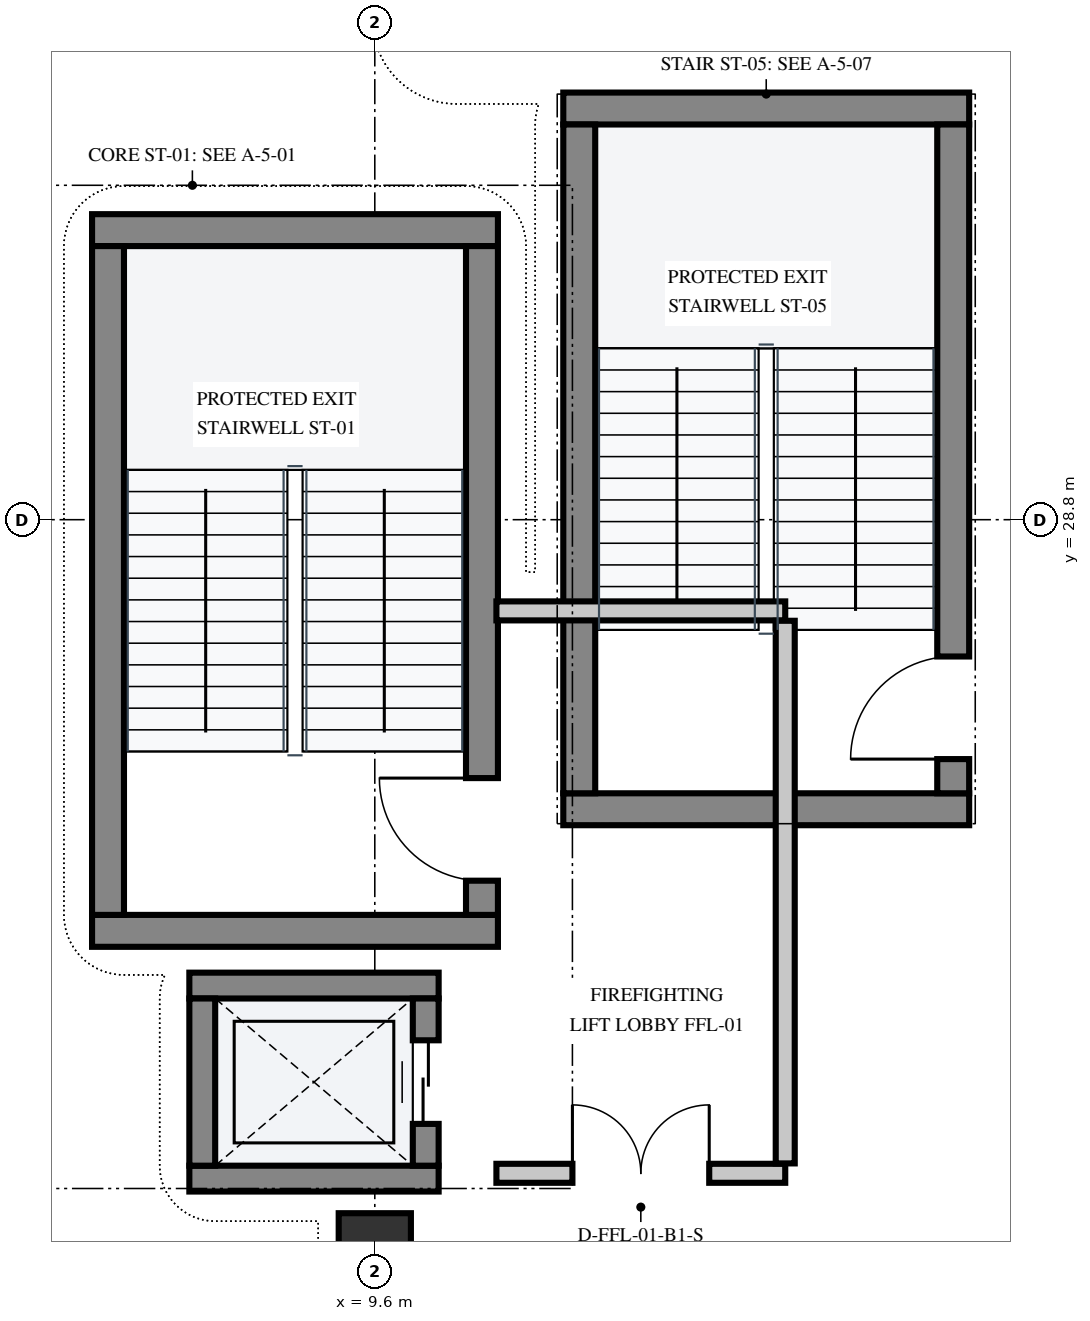
"""IFC4 building model, lengths in metres.
Left out: names, types, materials, properties, quantities, classifications, styles, units other than length and angle.
Written with IfcOpenShell. Run it as: python <this file> out.ifc"""

import sys

from ifc_helpers import new_model, si_unit, direction, frame, frame_2d, origin, origin_2d, place, context, subcontext, project, spatial, rectangle, extrude, element, fill, save


model = new_model("IFC4")
c1 = context("Model", 3, precision=1e-05, world=origin(), true_north=direction((0.0, 1.0)))
c2 = subcontext(c1, "Body", "Model", "MODEL_VIEW")
j1 = project(units=[si_unit("LENGTHUNIT", "METRE"), si_unit("PLANEANGLEUNIT", "RADIAN")], contexts=[c1])
p1 = place(None, origin())
s1 = spatial("IfcSite", under=j1, at=p1, CompositionType="ELEMENT")
p2 = place(p1, origin())
s2 = spatial("IfcBuilding", under=s1, at=p2, CompositionType="ELEMENT")
p3 = place(p2, frame((0.0, 0.0, -4.8)))
s3 = spatial("IfcBuildingStorey", under=s2, at=p3, CompositionType="ELEMENT", Elevation=-4.8)
p4 = place(p3, frame((9.6, 19.2, 0.0), z_axis=(0.0, 0.0, 1.0), x_axis=(1.0, 0.0, 0.0)))
e1 = element("IfcColumn", 1, at=p4, inside=s3, PredefinedType="COLUMN", context=c2, shape_type="SweptSolid", body=[
    extrude(rectangle(XDim=0.95, YDim=0.95, at=origin_2d()), origin(), (0.0, 0.0, 1.0), 4.8),
])
for number, where, z_axis, x_axis in (
    (2, (5.88, 23.39, 0.0), (0.0, 0.0, 1.0), (1.0, 0.0, 0.0)),
    (3, (5.88, 32.61, 0.0), (0.0, 0.0, 1.0), (1.0, 0.0, 0.0)),
):
    element("IfcWall", number, at=place(p3, frame(where, z_axis=z_axis, x_axis=x_axis)), inside=s3, PredefinedType="SHEAR", context=c2, shape_type="SweptSolid", body=[
        extrude(rectangle(XDim=5.34, YDim=0.42, at=frame_2d((2.67, 0.0))), origin(), (0.0, 0.0, 1.0), 4.5),
    ])
p5 = place(p3, frame((11.01, 23.6, 0.0), z_axis=(0.0, 0.0, 1.0), x_axis=(0.0, 1.0, 0.0)))
e4 = element("IfcWall", 4, at=p5, inside=s3, PredefinedType="SHEAR", context=c2, shape_type="SweptSolid", body=[
    extrude(rectangle(XDim=8.8, YDim=0.42, at=frame_2d((4.4, 0.0))), origin(), (0.0, 0.0, 1.0), 4.5),
])
p6 = place(p5, frame((0.45, 0.0, 0.0)))
e5 = element("IfcOpeningElement", 5, at=p6, cuts=e4, PredefinedType="OPENING", context=c2, shape_type="SweptSolid", body=[
    extrude(rectangle(XDim=1.35, YDim=2.2, at=frame_2d((0.675, 1.1))), frame((0.0, 0.222, 0.0), z_axis=(0.0, -1.0, 0.0), x_axis=(1.0, 0.0, 0.0)), (0.0, 0.0, 1.0), 0.444),
])
p7 = place(p3, frame((6.09, 23.6, 0.0), z_axis=(0.0, 0.0, 1.0), x_axis=(0.0, 1.0, 0.0)))
e6 = element("IfcWall", 6, at=p7, inside=s3, PredefinedType="SHEAR", context=c2, shape_type="SweptSolid", body=[
    extrude(rectangle(XDim=8.8, YDim=0.42, at=frame_2d((4.4, 0.0))), origin(), (0.0, 0.0, 1.0), 4.5),
])
for number, where, z_axis, x_axis in (
    (7, (12.08, 24.99, 0.0), (0.0, 0.0, 1.0), (1.0, 0.0, 0.0)),
    (8, (12.08, 34.21, 0.0), (0.0, 0.0, 1.0), (1.0, 0.0, 0.0)),
):
    element("IfcWall", number, at=place(p3, frame(where, z_axis=z_axis, x_axis=x_axis)), inside=s3, PredefinedType="SHEAR", context=c2, shape_type="SweptSolid", body=[
        extrude(rectangle(XDim=5.34, YDim=0.42, at=frame_2d((2.67, 0.0))), origin(), (0.0, 0.0, 1.0), 4.5),
    ])
p8 = place(p3, frame((17.21, 25.2, 0.0), z_axis=(0.0, 0.0, 1.0), x_axis=(0.0, 1.0, 0.0)))
e9 = element("IfcWall", 9, at=p8, inside=s3, PredefinedType="SHEAR", context=c2, shape_type="SweptSolid", body=[
    extrude(rectangle(XDim=8.8, YDim=0.42, at=frame_2d((4.4, 0.0))), origin(), (0.0, 0.0, 1.0), 4.5),
])
p9 = place(p8, frame((0.45, 0.0, 0.0)))
e10 = element("IfcOpeningElement", 10, at=p9, cuts=e9, PredefinedType="OPENING", context=c2, shape_type="SweptSolid", body=[
    extrude(rectangle(XDim=1.35, YDim=2.2, at=frame_2d((0.675, 1.1))), frame((0.0, 0.222, 0.0), z_axis=(0.0, -1.0, 0.0), x_axis=(1.0, 0.0, 0.0)), (0.0, 0.0, 1.0), 0.444),
])
p10 = place(p3, frame((12.29, 25.2, 0.0), z_axis=(0.0, 0.0, 1.0), x_axis=(0.0, 1.0, 0.0)))
e11 = element("IfcWall", 11, at=p10, inside=s3, PredefinedType="SHEAR", context=c2, shape_type="SweptSolid", body=[
    extrude(rectangle(XDim=8.8, YDim=0.42, at=frame_2d((4.4, 0.0))), origin(), (0.0, 0.0, 1.0), 4.5),
])
for number, where, z_axis, x_axis in (
    (12, (7.16, 20.13, 0.0), (0.0, 0.0, 1.0), (1.0, 0.0, 0.0)),
    (13, (7.16, 22.67, 0.0), (0.0, 0.0, 1.0), (1.0, 0.0, 0.0)),
):
    element("IfcWall", number, at=place(p3, frame(where, z_axis=z_axis, x_axis=x_axis)), inside=s3, PredefinedType="SHEAR", context=c2, shape_type="SweptSolid", body=[
        extrude(rectangle(XDim=3.28, YDim=0.34, at=frame_2d((1.64, 0.0))), origin(), (0.0, 0.0, 1.0), 4.5),
    ])
p11 = place(p3, frame((7.33, 20.3, 0.0), z_axis=(0.0, 0.0, 1.0), x_axis=(0.0, 1.0, 0.0)))
e14 = element("IfcWall", 14, at=p11, inside=s3, PredefinedType="SHEAR", context=c2, shape_type="SweptSolid", body=[
    extrude(rectangle(XDim=2.2, YDim=0.34, at=frame_2d((1.1, 0.0))), origin(), (0.0, 0.0, 1.0), 4.5),
])
p12 = place(p3, frame((10.27, 20.3, 0.0), z_axis=(0.0, 0.0, 1.0), x_axis=(0.0, 1.0, 0.0)))
e15 = element("IfcWall", 15, at=p12, inside=s3, PredefinedType="SHEAR", context=c2, shape_type="SweptSolid", body=[
    extrude(rectangle(XDim=2.2, YDim=0.34, at=frame_2d((1.1, 0.0))), origin(), (0.0, 0.0, 1.0), 4.5),
])
p13 = place(p12, frame((0.55, 0.0, 0.0)))
e16 = element("IfcOpeningElement", 16, at=p13, cuts=e15, PredefinedType="OPENING", context=c2, shape_type="SweptSolid", body=[
    extrude(rectangle(XDim=1.1, YDim=2.15, at=frame_2d((0.55, 1.075))), frame((0.0, 0.182, 0.0), z_axis=(0.0, -1.0, 0.0), x_axis=(1.0, 0.0, 0.0)), (0.0, 0.0, 1.0), 0.364),
])
p14 = place(p3, frame((11.2, 20.2, 0.0), z_axis=(0.0, 0.0, 1.0), x_axis=(1.0, 0.0, 0.0)))
e17 = element("IfcWall", 17, at=p14, inside=s3, PredefinedType="PARTITIONING", context=c2, shape_type="SweptSolid", body=[
    extrude(rectangle(XDim=3.8, YDim=0.25, at=frame_2d((1.9, 0.0))), origin(), (0.0, 0.0, 1.0), 4.5),
])
p15 = place(p14, frame((1.0, 0.0, 0.0)))
e18 = element("IfcOpeningElement", 18, at=p15, cuts=e17, PredefinedType="OPENING", context=c2, shape_type="SweptSolid", body=[
    extrude(rectangle(XDim=1.8, YDim=2.25, at=frame_2d((0.9, 1.125))), frame((0.0, 0.137, 0.0), z_axis=(0.0, -1.0, 0.0), x_axis=(1.0, 0.0, 0.0)), (0.0, 0.0, 1.0), 0.274),
])
p16 = place(p3, frame((11.2, 27.6, 0.0), z_axis=(0.0, 0.0, 1.0), x_axis=(1.0, 0.0, 0.0)))
e19 = element("IfcWall", 19, at=p16, inside=s3, PredefinedType="PARTITIONING", context=c2, shape_type="SweptSolid", body=[
    extrude(rectangle(XDim=3.8, YDim=0.25, at=frame_2d((1.9, 0.0))), origin(), (0.0, 0.0, 1.0), 4.5),
])
p17 = place(p3, frame((15.0, 20.33, 0.0), z_axis=(0.0, 0.0, 1.0), x_axis=(0.0, 1.0, 0.0)))
e20 = element("IfcWall", 20, at=p17, inside=s3, PredefinedType="PARTITIONING", context=c2, shape_type="SweptSolid", body=[
    extrude(rectangle(XDim=7.14, YDim=0.25, at=frame_2d((3.57, 0.0))), origin(), (0.0, 0.0, 1.0), 4.5),
])
p18 = place(p6, origin())
e21 = element("IfcDoor", 21, at=p18, inside=s3, OperationType="SINGLE_SWING_RIGHT", PredefinedType="DOOR", context=c2, shape_type="SweptSolid", body=[
    extrude(rectangle(XDim=1.35, YDim=2.2, at=frame_2d((0.675, 1.1))), frame((0.0, 0.025, 0.0), z_axis=(0.0, -1.0, 0.0), x_axis=(1.0, 0.0, 0.0)), (0.0, 0.0, 1.0), 0.05),
])
fill(e5, e21)
p19 = place(p9, origin())
e22 = element("IfcDoor", 22, at=p19, inside=s3, OperationType="SINGLE_SWING_LEFT", PredefinedType="DOOR", context=c2, shape_type="SweptSolid", body=[
    extrude(rectangle(XDim=1.35, YDim=2.2, at=frame_2d((0.675, 1.1))), frame((0.0, 0.025, 0.0), z_axis=(0.0, -1.0, 0.0), x_axis=(1.0, 0.0, 0.0)), (0.0, 0.0, 1.0), 0.05),
])
fill(e10, e22)
p20 = place(p13, origin())
e23 = element("IfcDoor", 23, at=p20, inside=s3, OperationType="DOUBLE_DOOR_SLIDING", PredefinedType="DOOR", context=c2, shape_type="SweptSolid", body=[
    extrude(rectangle(XDim=1.1, YDim=2.15, at=frame_2d((0.55, 1.075))), frame((0.0, 0.025, 0.0), z_axis=(0.0, -1.0, 0.0), x_axis=(1.0, 0.0, 0.0)), (0.0, 0.0, 1.0), 0.05),
])
fill(e16, e23)
p21 = place(p15, origin())
e24 = element("IfcDoor", 24, at=p21, inside=s3, OperationType="DOUBLE_DOOR_SINGLE_SWING", PredefinedType="DOOR", context=c2, shape_type="SweptSolid", body=[
    extrude(rectangle(XDim=1.8, YDim=2.25, at=frame_2d((0.9, 1.125))), frame((0.0, 0.025, 0.0), z_axis=(0.0, -1.0, 0.0), x_axis=(1.0, 0.0, 0.0)), (0.0, 0.0, 1.0), 0.05),
])
fill(e18, e24)
save(model, sys.argv[1])
